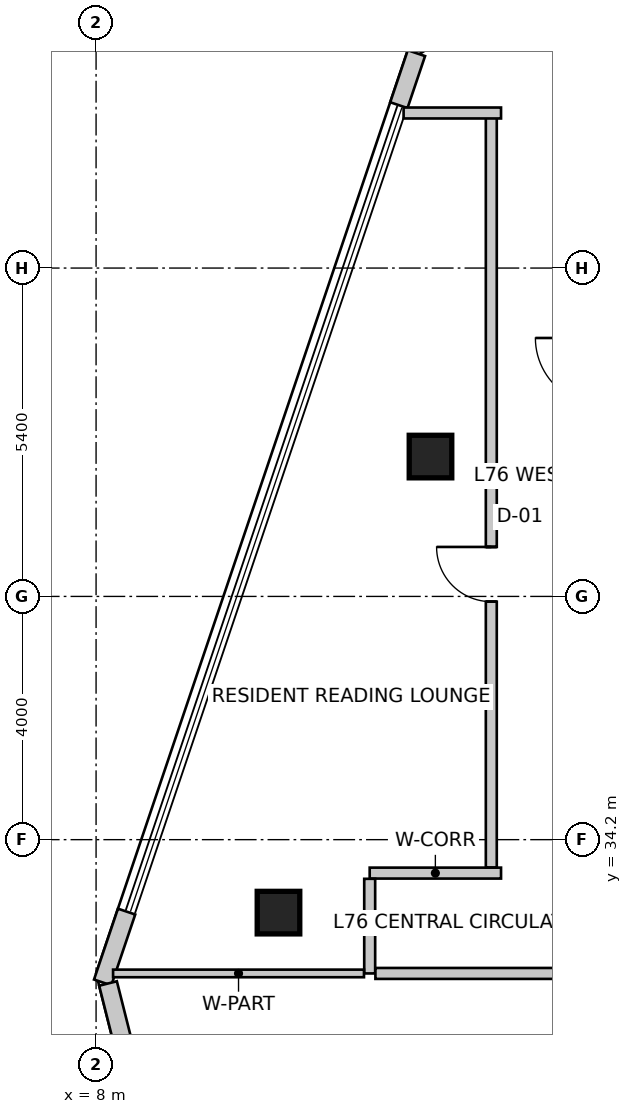
"""IFC4 building model, lengths in metres.
Left out: names, types, materials, properties, quantities, classifications, styles, units other than length and angle.
Written with IfcOpenShell. Run it as: python <this file> out.ifc"""

import sys

from ifc_helpers import new_model, si_unit, direction, frame, frame_2d, origin, origin_2d, place, context, subcontext, project, spatial, rectangle, extrude, source, transform, mapped, element, fill, save


model = new_model("IFC4")
c1 = context("Model", 3, precision=1e-05, world=origin(), true_north=direction((0.0, 1.0)))
c2 = subcontext(c1, "Body", "Model", "MODEL_VIEW")
j1 = project(units=[si_unit("LENGTHUNIT", "METRE"), si_unit("PLANEANGLEUNIT", "RADIAN")], contexts=[c1])
p1 = place(None, origin())
s1 = spatial("IfcSite", under=j1, at=p1, CompositionType="ELEMENT")
p2 = place(p1, origin())
s2 = spatial("IfcBuilding", under=s1, at=p2, CompositionType="ELEMENT")
p3 = place(p2, frame((0.0, 0.0, 296.5)))
s3 = spatial("IfcBuildingStorey", under=s2, at=p3, CompositionType="ELEMENT", Elevation=296.5)
m1 = source(origin(), c2, "Body", "SweptSolid", [
    extrude(rectangle(XDim=0.7, YDim=0.7, at=origin_2d()), origin(), (0.0, 0.0, 1.0), 4.0),
])
for number, where, z_axis, x_axis in (
    (1, (11.0, 33.0, 0.0), (0.0, 0.0, 1.0), (1.0, 0.0, 0.0)),
    (2, (13.5, 40.5, 0.0), (0.0, 0.0, 1.0), (1.0, 0.0, 0.0)),
):
    element("IfcColumn", number, at=place(p3, frame(where, z_axis=z_axis, x_axis=x_axis)), inside=s3, PredefinedType="COLUMN", context=c2, shape_type="MappedRepresentation", body=[
        mapped(m1, transform((0.0, 0.0, 0.0), scale=1.0)),
    ])
p4 = place(p3, frame((21.873, 52.741, 0.0), z_axis=(0.0, 0.0, 1.0), x_axis=(-0.843661487732, -0.536875492193, 0.0)))
e3 = element("IfcWall", 3, at=p4, inside=s3, PredefinedType="SOLIDWALL", context=c2, shape_type="SweptSolid", body=[
    extrude(rectangle(XDim=10.282, YDim=0.3, at=frame_2d((5.141, 0.0))), origin(), (0.0, 0.0, 1.0), 3.75),
])
m2 = source(origin(), c2, "Body", "SweptSolid", [
    extrude(rectangle(XDim=2.4, YDim=2.2, at=frame_2d((1.2, 1.1))), frame((0.0, 0.16, 0.0), z_axis=(0.0, -1.0, 0.0), x_axis=(1.0, 0.0, 0.0)), (0.0, 0.0, 1.0), 0.32),
])
p5 = place(p4, frame((1.26, 0.0, 0.85)))
e4 = element("IfcOpeningElement", 4, at=p5, cuts=e3, PredefinedType="OPENING", context=c2, shape_type="MappedRepresentation", body=[
    mapped(m2, transform((0.0, 0.0, 0.0), scale=1.0)),
])
m3 = source(origin(), c2, "Body", "SweptSolid", [
    extrude(rectangle(XDim=2.8, YDim=2.4, at=frame_2d((1.4, 1.2))), frame((0.0, 0.16, 0.0), z_axis=(0.0, -1.0, 0.0), x_axis=(1.0, 0.0, 0.0)), (0.0, 0.0, 1.0), 0.32),
])
p6 = place(p4, frame((5.339, 0.0, 0.85)))
e5 = element("IfcOpeningElement", 5, at=p6, cuts=e3, PredefinedType="OPENING", context=c2, shape_type="MappedRepresentation", body=[
    mapped(m3, transform((0.0, 0.0, 0.0), scale=1.0)),
])
p7 = place(p3, frame((13.269, 47.134, 0.0), z_axis=(0.0, 0.0, 1.0), x_axis=(-0.31995770778, -0.947431826166, 0.0)))
e6 = element("IfcWall", 6, at=p7, inside=s3, PredefinedType="SOLIDWALL", context=c2, shape_type="SweptSolid", body=[
    extrude(rectangle(XDim=0.903, YDim=0.3, at=frame_2d((0.451, 0.0))), origin(), (0.0, 0.0, 1.0), 3.75),
])
p8 = place(p3, frame((8.502, 33.017, 0.0), z_axis=(0.0, 0.0, 1.0), x_axis=(-0.319798692732, -0.947485512357, 0.0)))
e7 = element("IfcWall", 7, at=p8, inside=s3, PredefinedType="SOLIDWALL", context=c2, shape_type="SweptSolid", body=[
    extrude(rectangle(XDim=1.23, YDim=0.3, at=frame_2d((0.615, 0.0))), origin(), (0.0, 0.0, 1.0), 3.75),
])
p9 = place(p3, frame((8.196, 31.835, 0.0), z_axis=(0.0, 0.0, 1.0), x_axis=(0.244430846523, -0.969666726906, 0.0)))
e8 = element("IfcWall", 8, at=p9, inside=s3, PredefinedType="SOLIDWALL", context=c2, shape_type="SweptSolid", body=[
    extrude(rectangle(XDim=7.152, YDim=0.3, at=frame_2d((3.576, 0.0))), origin(), (0.0, 0.0, 1.0), 3.75),
])
p10 = place(p9, frame((1.066, 0.0, 0.85)))
e9 = element("IfcOpeningElement", 9, at=p10, cuts=e8, PredefinedType="OPENING", context=c2, shape_type="MappedRepresentation", body=[
    mapped(m2, transform((0.0, 0.0, 0.0), scale=1.0)),
])
m4 = source(origin(), c2, "Body", "SweptSolid", [
    extrude(rectangle(XDim=1.8, YDim=2.1, at=frame_2d((0.9, 1.05))), frame((0.0, 0.16, 0.0), z_axis=(0.0, -1.0, 0.0), x_axis=(1.0, 0.0, 0.0)), (0.0, 0.0, 1.0), 0.32),
])
p11 = place(p9, frame((4.842, 0.0, 0.85)))
e10 = element("IfcOpeningElement", 10, at=p11, cuts=e8, PredefinedType="OPENING", context=c2, shape_type="MappedRepresentation", body=[
    mapped(m4, transform((0.0, 0.0, 0.0), scale=1.0)),
])
p12 = place(p3, frame((12.5, 33.65, 0.0), z_axis=(0.0, 0.0, 1.0), x_axis=(1.0, 0.0, 0.0)))
e11 = element("IfcWall", 11, at=p12, inside=s3, PredefinedType="PARTITIONING", context=c2, shape_type="SweptSolid", body=[
    extrude(rectangle(XDim=2.16, YDim=0.18, at=frame_2d((1.08, 0.0))), origin(), (0.0, 0.0, 1.0), 3.75),
])
p13 = place(p3, frame((12.5, 32.0, 0.0), z_axis=(0.0, 0.0, 1.0), x_axis=(0.0, 1.0, 0.0)))
e12 = element("IfcWall", 12, at=p13, inside=s3, PredefinedType="PARTITIONING", context=c2, shape_type="SweptSolid", body=[
    extrude(rectangle(XDim=1.556, YDim=0.18, at=frame_2d((0.778, 0.0))), origin(), (0.0, 0.0, 1.0), 3.419),
])
p14 = place(p3, frame((26.065, 32.0, 0.0), z_axis=(0.0, 0.0, 1.0), x_axis=(-1.0, 0.0, 0.0)))
e13 = element("IfcWall", 13, at=p14, inside=s3, PredefinedType="PARTITIONING", context=c2, shape_type="SweptSolid", body=[
    extrude(rectangle(XDim=13.471, YDim=0.18, at=frame_2d((6.736, 0.0))), origin(), (0.0, 0.0, 1.0), 3.419),
])
m5 = source(origin(), c2, "Body", "SweptSolid", [
    extrude(rectangle(XDim=1.6, YDim=2.15, at=frame_2d((0.8, 1.075))), frame((0.0, 0.1, 0.0), z_axis=(0.0, -1.0, 0.0), x_axis=(1.0, 0.0, 0.0)), (0.0, 0.0, 1.0), 0.2),
])
p15 = place(p14, frame((5.936, 0.0, 0.0)))
e14 = element("IfcOpeningElement", 14, at=p15, cuts=e13, PredefinedType="OPENING", context=c2, shape_type="MappedRepresentation", body=[
    mapped(m5, transform((0.0, 0.0, 0.0), scale=1.0)),
])
p16 = place(p3, frame((14.5, 33.744, 0.0), z_axis=(0.0, 0.0, 1.0), x_axis=(0.0, 1.0, 0.0)))
e15 = element("IfcWall", 15, at=p16, inside=s3, PredefinedType="PARTITIONING", context=c2, shape_type="SweptSolid", body=[
    extrude(rectangle(XDim=12.406, YDim=0.18, at=frame_2d((6.203, 0.0))), origin(), (0.0, 0.0, 1.0), 3.75),
])
m6 = source(origin(), c2, "Body", "SweptSolid", [
    extrude(rectangle(XDim=0.9, YDim=2.15, at=frame_2d((0.45, 1.075))), frame((0.0, 0.1, 0.0), z_axis=(0.0, -1.0, 0.0), x_axis=(1.0, 0.0, 0.0)), (0.0, 0.0, 1.0), 0.2),
])
p17 = place(p16, frame((4.37, 0.0, 0.0)))
e16 = element("IfcOpeningElement", 16, at=p17, cuts=e15, PredefinedType="OPENING", context=c2, shape_type="MappedRepresentation", body=[
    mapped(m6, transform((0.0, 0.0, 0.0), scale=1.0)),
])
p18 = place(p3, frame((14.66, 46.15, 0.0), z_axis=(0.0, 0.0, 1.0), x_axis=(-1.0, 0.0, 0.0)))
e17 = element("IfcWall", 17, at=p18, inside=s3, PredefinedType="PARTITIONING", context=c2, shape_type="SweptSolid", body=[
    extrude(rectangle(XDim=1.602, YDim=0.18, at=frame_2d((0.801, 0.0))), origin(), (0.0, 0.0, 1.0), 3.75),
])
p19 = place(p3, frame((12.406, 32.0, 0.0), z_axis=(0.0, 0.0, 1.0), x_axis=(-1.0, 0.0, 0.0)))
e18 = element("IfcWall", 18, at=p19, inside=s3, PredefinedType="PARTITIONING", context=c2, shape_type="SweptSolid", body=[
    extrude(rectangle(XDim=4.126, YDim=0.125, at=frame_2d((2.063, 0.0))), origin(), (0.0, 0.0, 1.0), 3.042),
])
m7 = source(origin(), c2, "Body", "SweptSolid", [
    extrude(rectangle(XDim=0.9, YDim=2.15, at=frame_2d((0.45, 1.075))), frame((0.0, 0.025, 0.0), z_axis=(0.0, -1.0, 0.0), x_axis=(1.0, 0.0, 0.0)), (0.0, 0.0, 1.0), 0.05),
])
p20 = place(p17, origin())
e19 = element("IfcDoor", 19, at=p20, inside=s3, OperationType="SINGLE_SWING_RIGHT", PredefinedType="DOOR", context=c2, shape_type="MappedRepresentation", body=[
    mapped(m7, transform((0.0, 0.0, 0.0), scale=1.0)),
])
fill(e16, e19)
save(model, sys.argv[1])
